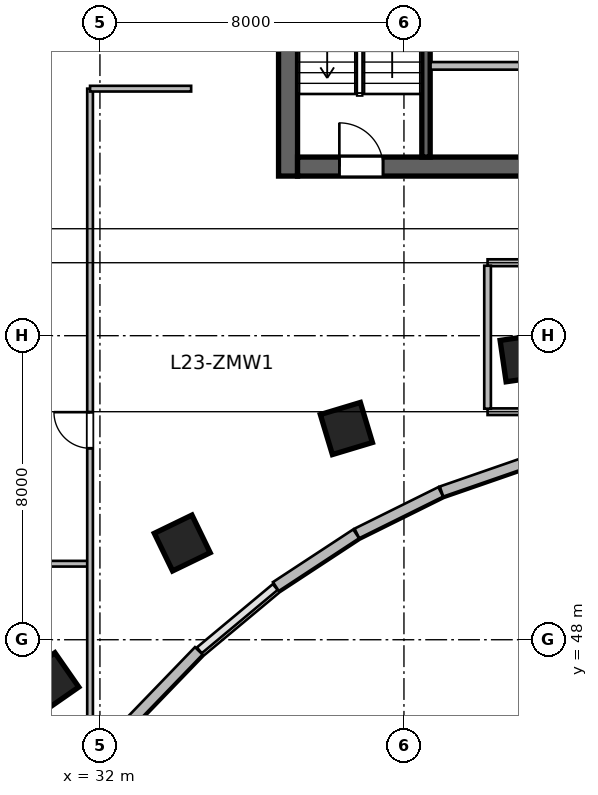
"""IFC4 building model, lengths in metres.
Left out: names, types, materials, properties, quantities, classifications, styles, units other than length and angle.
Written with IfcOpenShell. Run it as: python <this file> out.ifc"""

import sys

from ifc_helpers import new_model, si_unit, direction, frame, frame_2d, origin, origin_2d, place, context, subcontext, project, spatial, rectangle, extrude, source, transform, mapped, element, fill, save


model = new_model("IFC4")
c1 = context("Model", 3, precision=1e-05, world=origin(), true_north=direction((0.0, 1.0)))
c2 = subcontext(c1, "Body", "Model", "MODEL_VIEW")
j1 = project(units=[si_unit("LENGTHUNIT", "METRE"), si_unit("PLANEANGLEUNIT", "RADIAN")], contexts=[c1])
p1 = place(None, origin())
s1 = spatial("IfcSite", under=j1, at=p1, CompositionType="ELEMENT")
p2 = place(p1, origin())
s2 = spatial("IfcBuilding", under=s1, at=p2, CompositionType="ELEMENT")
p3 = place(p2, frame((0.0, 0.0, 99.9)))
s3 = spatial("IfcBuildingStorey", under=s2, at=p3, CompositionType="ELEMENT", Elevation=99.9)
m1 = source(origin(), c2, "Body", "SweptSolid", [
    extrude(rectangle(XDim=12.0, YDim=0.5, at=frame_2d((6.0, 0.0))), origin(), (0.0, 0.0, 1.0), 3.9),
])
p4 = place(p3, frame((36.95, 60.2, 0.0), z_axis=(0.0, 0.0, 1.0), x_axis=(0.0, 1.0, 0.0)))
e1 = element("IfcWall", 1, at=p4, inside=s3, PredefinedType="SHEAR", context=c2, shape_type="MappedRepresentation", body=[
    mapped(m1, transform((0.0, 0.0, 0.0), scale=1.0)),
])
m2 = source(origin(), c2, "Body", "SweptSolid", [
    extrude(rectangle(XDim=21.6, YDim=0.5, at=frame_2d((10.8, 0.0))), origin(), (0.0, 0.0, 1.0), 3.9),
])
p5 = place(p3, frame((37.2, 60.45, 0.0), z_axis=(0.0, 0.0, 1.0), x_axis=(1.0, 0.0, 0.0)))
e2 = element("IfcWall", 2, at=p5, inside=s3, PredefinedType="SHEAR", context=c2, shape_type="MappedRepresentation", body=[
    mapped(m2, transform((0.0, 0.0, 0.0), scale=1.0)),
])
p6 = place(p5, frame((1.1, 0.0, 0.0)))
e3 = element("IfcOpeningElement", 3, at=p6, cuts=e2, PredefinedType="OPENING", context=c2, shape_type="SweptSolid", body=[
    extrude(rectangle(XDim=1.15, YDim=2.15, at=frame_2d((0.575, 1.075))), frame((0.0, 0.26, 0.0), z_axis=(0.0, -1.0, 0.0), x_axis=(1.0, 0.0, 0.0)), (0.0, 0.0, 1.0), 0.52),
])
p7 = place(p5, frame((19.5, 0.0, 0.0)))
e4 = element("IfcOpeningElement", 4, at=p7, cuts=e2, PredefinedType="OPENING", context=c2, shape_type="SweptSolid", body=[
    extrude(rectangle(XDim=0.9, YDim=2.1, at=frame_2d((0.45, 1.05))), frame((0.0, 0.26, 0.0), z_axis=(0.0, -1.0, 0.0), x_axis=(1.0, 0.0, 0.0)), (0.0, 0.0, 1.0), 0.52),
])
p8 = place(p5, frame((12.02, 0.0, 0.0)))
e5 = element("IfcOpeningElement", 5, at=p8, cuts=e2, PredefinedType="OPENING", context=c2, shape_type="SweptSolid", body=[
    extrude(rectangle(XDim=1.6, YDim=2.15, at=frame_2d((0.8, 1.075))), frame((0.0, 0.26, 0.0), z_axis=(0.0, -1.0, 0.0), x_axis=(1.0, 0.0, 0.0)), (0.0, 0.0, 1.0), 0.52),
])
m3 = source(origin(), c2, "Body", "SweptSolid", [
    extrude(rectangle(XDim=11.0, YDim=0.22, at=frame_2d((5.5, 0.0))), origin(), (0.0, 0.0, 1.0), 3.9),
])
p9 = place(p3, frame((40.58, 60.7, 0.0), z_axis=(0.0, 0.0, 1.0), x_axis=(0.0, 1.0, 0.0)))
e6 = element("IfcWall", 6, at=p9, inside=s3, PredefinedType="SHEAR", context=c2, shape_type="MappedRepresentation", body=[
    mapped(m3, transform((0.0, 0.0, 0.0), scale=1.0)),
])
m4 = source(origin(), c2, "Body", "SweptSolid", [
    extrude(rectangle(XDim=1.1, YDim=1.1, at=origin_2d()), origin(), (0.0, 0.0, 1.0), 3.9),
])
for number, where, z_axis, x_axis in (
    (7, (30.677, 46.892, 0.0), (0.0, 0.0, 1.0), (-0.571, 0.821, 0.0)),
    (8, (34.166, 50.545, 0.0), (0.0, 0.0, 1.0), (-0.436, 0.9, 0.0)),
    (9, (38.485, 53.558, 0.0), (0.0, 0.0, 1.0), (-0.289, 0.957, 0.0)),
    (10, (43.154, 55.411, 0.0), (0.0, 0.0, 1.0), (-0.143, 0.99, 0.0)),
):
    element("IfcColumn", number, at=place(p3, frame(where, z_axis=z_axis, x_axis=x_axis)), inside=s3, PredefinedType="COLUMN", context=c2, shape_type="MappedRepresentation", body=[
        mapped(m4, transform((0.0, 0.0, 0.0), scale=1.0)),
    ])
m5 = source(origin(), c2, "Body", "SweptSolid", [
    extrude(rectangle(XDim=2.411, YDim=0.28, at=frame_2d((1.205, 0.0))), origin(), (0.0, 0.0, 1.0), 3.65),
])
p10 = place(p3, frame((43.266, 52.689, 0.0), z_axis=(0.0, 0.0, 1.0), x_axis=(-0.944880068161, -0.327416640982, 0.0)))
e11 = element("IfcWall", 11, at=p10, inside=s3, PredefinedType="SOLIDWALL", context=c2, shape_type="MappedRepresentation", body=[
    mapped(m5, transform((0.0, 0.0, 0.0), scale=1.0)),
])
m6 = source(origin(), c2, "Body", "SweptSolid", [
    extrude(rectangle(XDim=2.462, YDim=0.28, at=frame_2d((1.231, 0.0))), origin(), (0.0, 0.0, 1.0), 3.65),
])
p11 = place(p3, frame((40.967, 51.891, 0.0), z_axis=(0.0, 0.0, 1.0), x_axis=(-0.8959882207, -0.444077817917, 0.0)))
e12 = element("IfcWall", 12, at=p11, inside=s3, PredefinedType="SOLIDWALL", context=c2, shape_type="MappedRepresentation", body=[
    mapped(m6, transform((0.0, 0.0, 0.0), scale=1.0)),
])
m7 = source(origin(), c2, "Body", "SweptSolid", [
    extrude(rectangle(XDim=2.527, YDim=0.28, at=frame_2d((1.264, 0.0))), origin(), (0.0, 0.0, 1.0), 3.65),
])
p12 = place(p3, frame((38.742, 50.786, 0.0), z_axis=(0.0, 0.0, 1.0), x_axis=(-0.836011905051, -0.548711303523, 0.0)))
e13 = element("IfcWall", 13, at=p12, inside=s3, PredefinedType="SOLIDWALL", context=c2, shape_type="MappedRepresentation", body=[
    mapped(m7, transform((0.0, 0.0, 0.0), scale=1.0)),
])
m8 = source(origin(), c2, "Body", "SweptSolid", [
    extrude(rectangle(XDim=2.68, YDim=0.28, at=frame_2d((1.34, 0.0))), origin(), (0.0, 0.0, 1.0), 3.65),
])
p13 = place(p3, frame((34.601, 47.708, 0.0), z_axis=(0.0, 0.0, 1.0), x_axis=(-0.694561996568, -0.719432855049, 0.0)))
e14 = element("IfcWall", 14, at=p13, inside=s3, PredefinedType="SOLIDWALL", context=c2, shape_type="MappedRepresentation", body=[
    mapped(m8, transform((0.0, 0.0, 0.0), scale=1.0)),
])
m9 = source(origin(), c2, "Body", "SweptSolid", [
    extrude(rectangle(XDim=8.02, YDim=0.2, at=frame_2d((4.01, 0.0))), origin(), (0.0, 0.0, 1.0), 3.65),
])
p14 = place(p3, frame((40.7, 63.1, 0.0), z_axis=(0.0, 0.0, 1.0), x_axis=(1.0, 0.0, 0.0)))
e15 = element("IfcWall", 15, at=p14, inside=s3, PredefinedType="SOLIDWALL", context=c2, shape_type="MappedRepresentation", body=[
    mapped(m9, transform((0.0, 0.0, 0.0), scale=1.0)),
])
p15 = place(p14, frame((3.4, 0.0, 0.0)))
e16 = element("IfcOpeningElement", 16, at=p15, cuts=e15, PredefinedType="OPENING", context=c2, shape_type="SweptSolid", body=[
    extrude(rectangle(XDim=0.95, YDim=2.15, at=frame_2d((0.475, 1.075))), frame((0.0, 0.11, 0.0), z_axis=(0.0, -1.0, 0.0), x_axis=(1.0, 0.0, 0.0)), (0.0, 0.0, 1.0), 0.22),
])
m10 = source(origin(), c2, "Body", "SweptSolid", [
    extrude(rectangle(XDim=4.176, YDim=0.175, at=frame_2d((2.088, 0.0))), origin(), (0.0, 0.0, 1.0), 3.65),
])
p16 = place(p3, frame((42.2, 54.0, 0.0), z_axis=(0.0, 0.0, 1.0), x_axis=(1.0, 0.0, 0.0)))
e17 = element("IfcWall", 17, at=p16, inside=s3, PredefinedType="PARTITIONING", context=c2, shape_type="MappedRepresentation", body=[
    mapped(m10, transform((0.0, 0.0, 0.0), scale=1.0)),
])
m11 = source(origin(), c2, "Body", "SweptSolid", [
    extrude(rectangle(XDim=4.176, YDim=0.18, at=frame_2d((2.088, 0.0))), origin(), (0.0, 0.0, 1.0), 3.65),
])
p17 = place(p3, frame((42.2, 57.92, 0.0), z_axis=(0.0, 0.0, 1.0), x_axis=(1.0, 0.0, 0.0)))
e18 = element("IfcWall", 18, at=p17, inside=s3, PredefinedType="PLUMBINGWALL", context=c2, shape_type="MappedRepresentation", body=[
    mapped(m11, transform((0.0, 0.0, 0.0), scale=1.0)),
])
p18 = place(p17, frame((1.638, 0.0, 0.0)))
e19 = element("IfcOpeningElement", 19, at=p18, cuts=e18, PredefinedType="OPENING", context=c2, shape_type="SweptSolid", body=[
    extrude(rectangle(XDim=0.9, YDim=2.08, at=frame_2d((0.45, 1.04))), frame((0.0, 0.1, 0.0), z_axis=(0.0, -1.0, 0.0), x_axis=(1.0, 0.0, 0.0)), (0.0, 0.0, 1.0), 0.2),
])
m12 = source(origin(), c2, "Body", "SweptSolid", [
    extrude(rectangle(XDim=3.763, YDim=0.175, at=frame_2d((1.881, 0.0))), origin(), (0.0, 0.0, 1.0), 3.65),
])
p19 = place(p3, frame((42.2, 54.079, 0.0), z_axis=(0.0, 0.0, 1.0), x_axis=(0.0, 1.0, 0.0)))
e20 = element("IfcWall", 20, at=p19, inside=s3, PredefinedType="PARTITIONING", context=c2, shape_type="MappedRepresentation", body=[
    mapped(m12, transform((0.0, 0.0, 0.0), scale=1.0)),
])
m13 = source(origin(), c2, "Body", "SweptSolid", [
    extrude(rectangle(XDim=2.5, YDim=0.15, at=frame_2d((1.25, 0.0))), origin(), (0.0, 0.0, 1.0), 3.65),
])
p20 = place(p3, frame((29.2, 50.0, 0.0), z_axis=(0.0, 0.0, 1.0), x_axis=(1.0, 0.0, 0.0)))
e21 = element("IfcWall", 21, at=p20, inside=s3, PredefinedType="PARTITIONING", context=c2, shape_type="MappedRepresentation", body=[
    mapped(m13, transform((0.0, 0.0, 0.0), scale=1.0)),
])
m14 = source(origin(), c2, "Body", "SweptSolid", [
    extrude(rectangle(XDim=17.974, YDim=0.15, at=frame_2d((8.987, 0.0))), origin(), (0.0, 0.0, 1.0), 2.942),
])
p21 = place(p3, frame((31.74, 44.526, 0.0), z_axis=(0.0, 0.0, 1.0), x_axis=(0.0, 1.0, 0.0)))
e22 = element("IfcWall", 22, at=p21, inside=s3, PredefinedType="PARTITIONING", context=c2, shape_type="MappedRepresentation", body=[
    mapped(m14, transform((0.0, 0.0, 0.0), scale=1.0)),
])
p22 = place(p21, frame((8.512, 0.0, 0.0)))
e23 = element("IfcOpeningElement", 23, at=p22, cuts=e22, PredefinedType="OPENING", context=c2, shape_type="SweptSolid", body=[
    extrude(rectangle(XDim=0.95, YDim=2.1, at=frame_2d((0.475, 1.05))), frame((0.0, 0.085, 0.0), z_axis=(0.0, -1.0, 0.0), x_axis=(1.0, 0.0, 0.0)), (0.0, 0.0, 1.0), 0.17),
])
m15 = source(origin(), c2, "Body", "SweptSolid", [
    extrude(rectangle(XDim=2.66, YDim=0.15, at=frame_2d((1.33, 0.0))), origin(), (0.0, 0.0, 1.0), 3.65),
])
p23 = place(p3, frame((31.74, 62.5, 0.0), z_axis=(0.0, 0.0, 1.0), x_axis=(1.0, 0.0, 0.0)))
e24 = element("IfcWall", 24, at=p23, inside=s3, PredefinedType="PARTITIONING", context=c2, shape_type="MappedRepresentation", body=[
    mapped(m15, transform((0.0, 0.0, 0.0), scale=1.0)),
])
m16 = source(origin(), c2, "Body", "SweptSolid", [
    extrude(rectangle(XDim=1.15, YDim=2.15, at=frame_2d((0.575, 1.075))), frame((0.0, 0.025, 0.0), z_axis=(0.0, -1.0, 0.0), x_axis=(1.0, 0.0, 0.0)), (0.0, 0.0, 1.0), 0.05),
])
p24 = place(p6, origin())
e25 = element("IfcDoor", 25, at=p24, inside=s3, OperationType="SINGLE_SWING_LEFT", PredefinedType="DOOR", context=c2, shape_type="MappedRepresentation", body=[
    mapped(m16, transform((0.0, 0.0, 0.0), scale=1.0)),
])
fill(e3, e25)
m17 = source(origin(), c2, "Body", "SweptSolid", [
    extrude(rectangle(XDim=0.95, YDim=2.1, at=frame_2d((0.475, 1.05))), frame((0.0, 0.025, 0.0), z_axis=(0.0, -1.0, 0.0), x_axis=(1.0, 0.0, 0.0)), (0.0, 0.0, 1.0), 0.05),
])
p25 = place(p22, origin())
e26 = element("IfcDoor", 26, at=p25, inside=s3, OperationType="SINGLE_SWING_RIGHT", PredefinedType="DOOR", context=c2, shape_type="MappedRepresentation", body=[
    mapped(m17, transform((0.0, 0.0, 0.0), scale=1.0)),
])
fill(e23, e26)
save(model, sys.argv[1])
